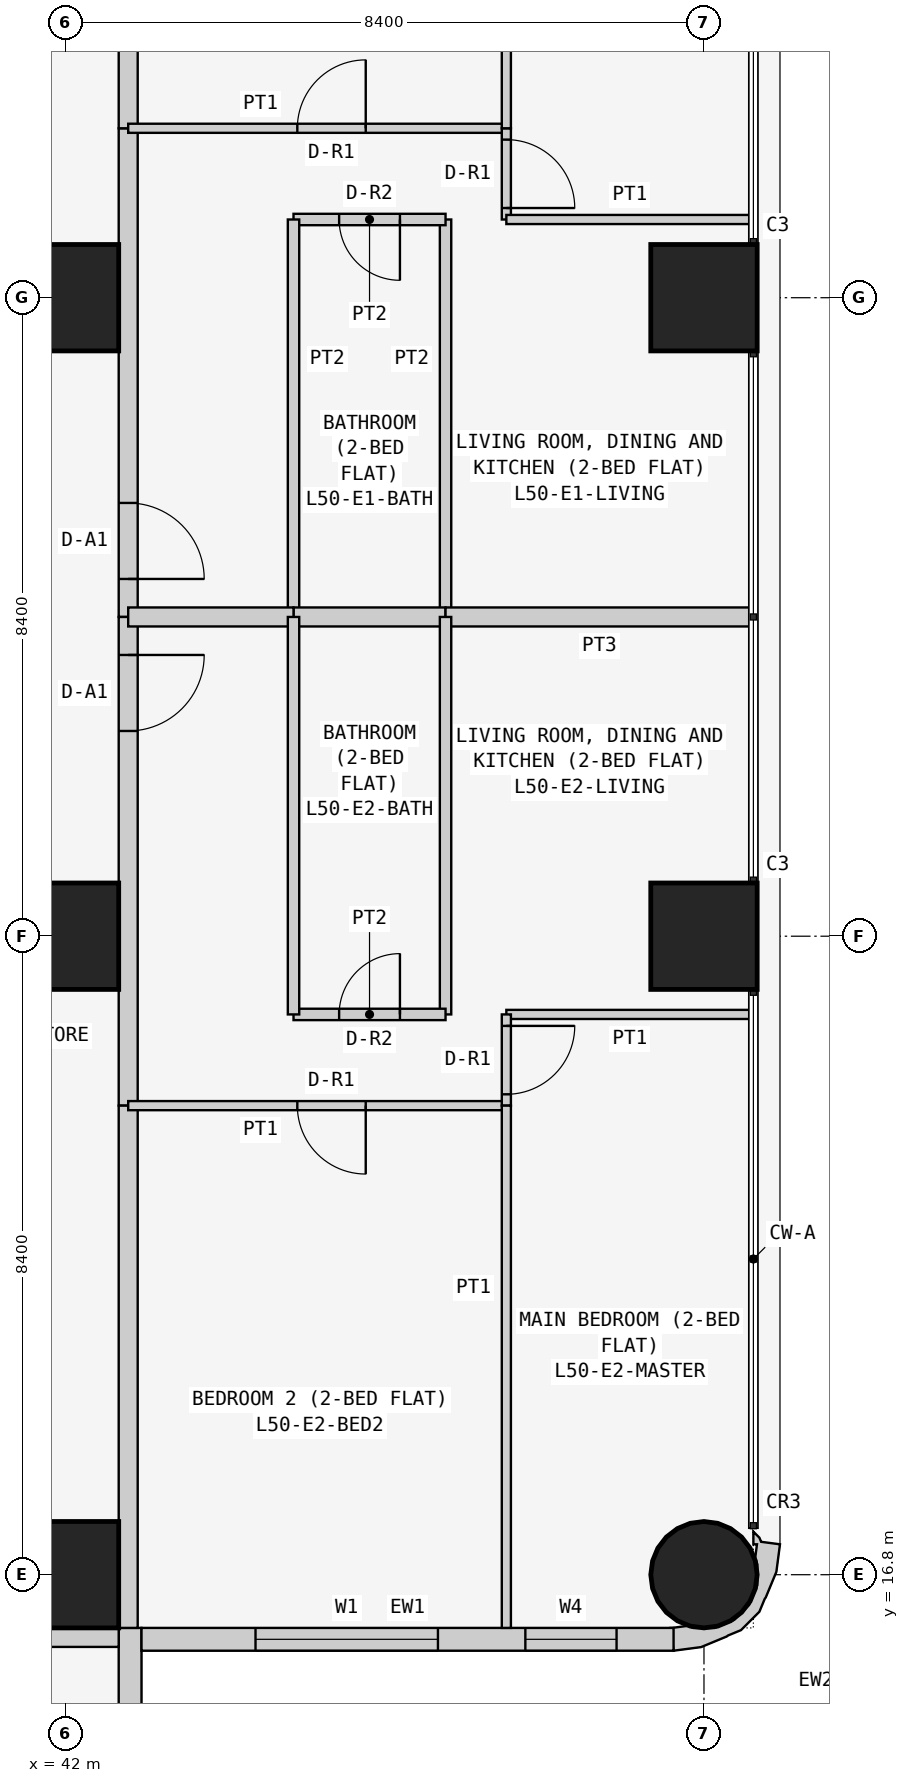
"""IFC4 building model, lengths in metres.
Left out: names, types, materials, properties, quantities, classifications, styles, units other than length and angle.
Written with IfcOpenShell. Run it as: python <this file> out.ifc"""

import sys

from ifc_helpers import new_model, si_unit, direction, frame, frame_2d, origin, origin_2d, place, context, subcontext, project, spatial, polyline, rectangle, circle, outline, extrude, element, fill, save


model = new_model("IFC4")
c1 = context("Model", 3, precision=1e-05, world=origin(), true_north=direction((0.0, 1.0)))
c2 = subcontext(c1, "Body", "Model", "MODEL_VIEW")
j1 = project(units=[si_unit("LENGTHUNIT", "METRE"), si_unit("PLANEANGLEUNIT", "RADIAN")], contexts=[c1])
p1 = place(None, origin())
s1 = spatial("IfcSite", under=j1, at=p1, CompositionType="ELEMENT")
p2 = place(p1, origin())
s2 = spatial("IfcBuilding", under=s1, at=p2, CompositionType="ELEMENT")
p3 = place(p2, frame((0.0, 0.0, 194.1)))
s3 = spatial("IfcBuildingStorey", under=s2, at=p3, CompositionType="ELEMENT", Elevation=194.1)
for number, where, z_axis, x_axis in (
    (1, (42.0, 16.8, 0.0), (0.0, 0.0, 1.0), (1.0, 0.0, 0.0)),
    (2, (42.0, 25.2, 0.0), (0.0, 0.0, 1.0), (1.0, 0.0, 0.0)),
    (3, (42.0, 33.6, 0.0), (0.0, 0.0, 1.0), (1.0, 0.0, 0.0)),
):
    element("IfcColumn", number, at=place(p3, frame(where, z_axis=z_axis, x_axis=x_axis)), inside=s3, PredefinedType="COLUMN", context=c2, shape_type="SweptSolid", body=[
        extrude(rectangle(XDim=1.4, YDim=1.4, at=origin_2d()), origin(), (0.0, 0.0, 1.0), 3.6),
    ])
p4 = place(p3, frame((50.4, 16.8, 0.0), z_axis=(0.0, 0.0, 1.0), x_axis=(1.0, 0.0, 0.0)))
e4 = element("IfcColumn", 4, at=p4, inside=s3, PredefinedType="COLUMN", context=c2, shape_type="SweptSolid", body=[
    extrude(circle(Radius=0.7, at=origin_2d()), origin(), (0.0, 0.0, 1.0), 3.6),
])
for number, where, z_axis, x_axis in (
    (5, (50.4, 25.2, 0.0), (0.0, 0.0, 1.0), (1.0, 0.0, 0.0)),
    (6, (50.4, 33.6, 0.0), (0.0, 0.0, 1.0), (1.0, 0.0, 0.0)),
):
    element("IfcColumn", number, at=place(p3, frame(where, z_axis=z_axis, x_axis=x_axis)), inside=s3, PredefinedType="COLUMN", context=c2, shape_type="SweptSolid", body=[
        extrude(rectangle(XDim=1.4, YDim=1.4, at=origin_2d()), origin(), (0.0, 0.0, 1.0), 3.6),
    ])
p5 = place(p3, frame((42.85, 8.8, 0.0), z_axis=(0.0, 0.0, 1.0), x_axis=(0.0, 1.0, 0.0)))
e7 = element("IfcWall", 7, at=p5, inside=s3, PredefinedType="SOLIDWALL", context=c2, shape_type="SweptSolid", body=[
    extrude(rectangle(XDim=7.3, YDim=0.3, at=frame_2d((3.65, 0.0))), origin(), (0.0, 0.0, 1.0), 3.45),
])
p6 = place(p5, frame((3.1, 0.0, 0.9)))
e8 = element("IfcOpeningElement", 8, at=p6, cuts=e7, PredefinedType="OPENING", context=c2, shape_type="SweptSolid", body=[
    extrude(rectangle(XDim=2.4, YDim=1.5, at=frame_2d((1.2, 0.75))), frame((0.0, 0.16, 0.0), z_axis=(0.0, -1.0, 0.0), x_axis=(1.0, 0.0, 0.0)), (0.0, 0.0, 1.0), 0.32),
])
p7 = place(p5, frame((0.75, 0.0, 0.9)))
e9 = element("IfcOpeningElement", 9, at=p7, cuts=e7, PredefinedType="OPENING", context=c2, shape_type="SweptSolid", body=[
    extrude(rectangle(XDim=1.2, YDim=1.5, at=frame_2d((0.6, 0.75))), frame((0.0, 0.16, 0.0), z_axis=(0.0, -1.0, 0.0), x_axis=(1.0, 0.0, 0.0)), (0.0, 0.0, 1.0), 0.32),
])
p8 = place(p3, frame((43.0, 15.95, 0.0), z_axis=(0.0, 0.0, 1.0), x_axis=(1.0, 0.0, 0.0)))
e10 = element("IfcWall", 10, at=p8, inside=s3, PredefinedType="SOLIDWALL", context=c2, shape_type="SweptSolid", body=[
    extrude(rectangle(XDim=7.0, YDim=0.3, at=frame_2d((3.5, 0.0))), origin(), (0.0, 0.0, 1.0), 3.45),
])
p9 = place(p8, frame((1.5, 0.0, 0.9)))
e11 = element("IfcOpeningElement", 11, at=p9, cuts=e10, PredefinedType="OPENING", context=c2, shape_type="SweptSolid", body=[
    extrude(rectangle(XDim=2.4, YDim=1.5, at=frame_2d((1.2, 0.75))), frame((0.0, 0.16, 0.0), z_axis=(0.0, -1.0, 0.0), x_axis=(1.0, 0.0, 0.0)), (0.0, 0.0, 1.0), 0.32),
])
p10 = place(p8, frame((5.05, 0.0, 0.9)))
e12 = element("IfcOpeningElement", 12, at=p10, cuts=e10, PredefinedType="OPENING", context=c2, shape_type="SweptSolid", body=[
    extrude(rectangle(XDim=1.2, YDim=1.5, at=frame_2d((0.6, 0.75))), frame((0.0, 0.16, 0.0), z_axis=(0.0, -1.0, 0.0), x_axis=(1.0, 0.0, 0.0)), (0.0, 0.0, 1.0), 0.32),
])
p11 = place(p3, frame((50.11, 16.076, 0.0), z_axis=(0.0, 0.0, 1.0), x_axis=(0.898030234854, -0.439933741929, 0.0)))
e13 = element("IfcWall", 13, at=p11, inside=s3, PredefinedType="SOLIDWALL", context=c2, shape_type="SweptSolid", body=[
    extrude(outline(polyline([(0.664, 1.577), (0.426, 1.497), (0.382, 1.536), (0.276, 1.572), (0.349, 1.423), (0.392, 1.444), (0.453, 1.261), (0.51, 1.211), (0.632, 0.961), (0.65, 0.683), (0.56, 0.419), (0.375, 0.21), (0.125, 0.087), (0.05, 0.082), (-0.128, -0.035), (-0.145, -0.044), (0.022, -0.296), (0.327, -0.094), (0.568, 0.18), (0.577, 0.199), (0.7, 0.337), (0.811, 0.661), (0.799, 0.846), (0.803, 0.866), (0.78, 1.231), (0.664, 1.577)])), origin(), (0.0, 0.0, 1.0), 3.45),
])
p12 = place(p3, frame((42.825, 35.829, 0.0), z_axis=(0.0, 0.0, 1.0), x_axis=(0.0, -1.0, 0.0)))
e14 = element("IfcWall", 14, at=p12, inside=s3, PredefinedType="PARTITIONING", context=c2, shape_type="SweptSolid", body=[
    extrude(rectangle(XDim=6.429, YDim=0.25, at=frame_2d((3.215, 0.0))), origin(), (0.0, 0.0, 1.0), 3.45),
])
p13 = place(p12, frame((4.929, 0.0, 0.0)))
e15 = element("IfcOpeningElement", 15, at=p13, cuts=e14, PredefinedType="OPENING", context=c2, shape_type="SweptSolid", body=[
    extrude(rectangle(XDim=1.0, YDim=2.1, at=frame_2d((0.5, 1.05))), frame((0.0, 0.135, 0.0), z_axis=(0.0, -1.0, 0.0), x_axis=(1.0, 0.0, 0.0)), (0.0, 0.0, 1.0), 0.27),
])
p14 = place(p3, frame((42.825, 42.7, 0.0), z_axis=(0.0, 0.0, 1.0), x_axis=(0.0, -1.0, 0.0)))
e16 = element("IfcWall", 16, at=p14, inside=s3, PredefinedType="PARTITIONING", context=c2, shape_type="SweptSolid", body=[
    extrude(rectangle(XDim=6.871, YDim=0.25, at=frame_2d((3.436, 0.0))), origin(), (0.0, 0.0, 1.0), 3.45),
])
p15 = place(p3, frame((42.825, 29.4, 0.0), z_axis=(0.0, 0.0, 1.0), x_axis=(0.0, -1.0, 0.0)))
e17 = element("IfcWall", 17, at=p15, inside=s3, PredefinedType="PARTITIONING", context=c2, shape_type="SweptSolid", body=[
    extrude(rectangle(XDim=6.429, YDim=0.25, at=frame_2d((3.214, 0.0))), origin(), (0.0, 0.0, 1.0), 3.45),
])
p16 = place(p15, frame((0.5, 0.0, 0.0)))
e18 = element("IfcOpeningElement", 18, at=p16, cuts=e17, PredefinedType="OPENING", context=c2, shape_type="SweptSolid", body=[
    extrude(rectangle(XDim=1.0, YDim=2.1, at=frame_2d((0.5, 1.05))), frame((0.0, 0.135, 0.0), z_axis=(0.0, -1.0, 0.0), x_axis=(1.0, 0.0, 0.0)), (0.0, 0.0, 1.0), 0.27),
])
for number, where, z_axis, x_axis in (
    (19, (42.825, 22.971, 0.0), (0.0, 0.0, 1.0), (0.0, -1.0, 0.0)),
    (20, (42.7, 15.975, 0.0), (0.0, 0.0, 1.0), (-1.0, 0.0, 0.0)),
):
    element("IfcWall", number, at=place(p3, frame(where, z_axis=z_axis, x_axis=x_axis)), inside=s3, PredefinedType="PARTITIONING", context=c2, shape_type="SweptSolid", body=[
        extrude(rectangle(XDim=6.871, YDim=0.25, at=frame_2d((3.436, 0.0))), origin(), (0.0, 0.0, 1.0), 3.45),
    ])
p17 = place(p3, frame((47.0, 29.4, 0.0), z_axis=(0.0, 0.0, 1.0), x_axis=(0.0, 1.0, 0.0)))
e21 = element("IfcWall", 21, at=p17, inside=s3, PredefinedType="PARTITIONING", context=c2, shape_type="SweptSolid", body=[
    extrude(rectangle(XDim=5.229, YDim=0.15, at=frame_2d((2.615, 0.0))), origin(), (0.0, 0.0, 1.0), 3.45),
])
p18 = place(p3, frame((47.0, 34.629, 0.0), z_axis=(0.0, 0.0, 1.0), x_axis=(-1.0, 0.0, 0.0)))
e22 = element("IfcWall", 22, at=p18, inside=s3, PredefinedType="PARTITIONING", context=c2, shape_type="SweptSolid", body=[
    extrude(rectangle(XDim=2.0, YDim=0.15, at=frame_2d((1.0, 0.0))), origin(), (0.0, 0.0, 1.0), 3.45),
])
p19 = place(p18, frame((0.6, 0.0, 0.0)))
e23 = element("IfcOpeningElement", 23, at=p19, cuts=e22, PredefinedType="OPENING", context=c2, shape_type="SweptSolid", body=[
    extrude(rectangle(XDim=0.8, YDim=2.1, at=frame_2d((0.4, 1.05))), frame((0.0, 0.085, 0.0), z_axis=(0.0, -1.0, 0.0), x_axis=(1.0, 0.0, 0.0)), (0.0, 0.0, 1.0), 0.17),
])
p20 = place(p3, frame((45.0, 34.629, 0.0), z_axis=(0.0, 0.0, 1.0), x_axis=(0.0, -1.0, 0.0)))
e24 = element("IfcWall", 24, at=p20, inside=s3, PredefinedType="PARTITIONING", context=c2, shape_type="SweptSolid", body=[
    extrude(rectangle(XDim=5.229, YDim=0.15, at=frame_2d((2.615, 0.0))), origin(), (0.0, 0.0, 1.0), 3.45),
])
p21 = place(p3, frame((45.0, 29.4, 0.0), z_axis=(0.0, 0.0, 1.0), x_axis=(1.0, 0.0, 0.0)))
e25 = element("IfcWall", 25, at=p21, inside=s3, PredefinedType="PARTITIONING", context=c2, shape_type="SweptSolid", body=[
    extrude(rectangle(XDim=2.0, YDim=0.25, at=frame_2d((1.0, 0.0))), origin(), (0.0, 0.0, 1.0), 3.45),
])
p22 = place(p3, frame((42.825, 35.829, 0.0), z_axis=(0.0, 0.0, 1.0), x_axis=(1.0, 0.0, 0.0)))
e26 = element("IfcWall", 26, at=p22, inside=s3, PredefinedType="PARTITIONING", context=c2, shape_type="SweptSolid", body=[
    extrude(rectangle(XDim=4.975, YDim=0.12, at=frame_2d((2.488, 0.0))), origin(), (0.0, 0.0, 1.0), 3.45),
])
p23 = place(p22, frame((2.225, 0.0, 0.0)))
e27 = element("IfcOpeningElement", 27, at=p23, cuts=e26, PredefinedType="OPENING", context=c2, shape_type="SweptSolid", body=[
    extrude(rectangle(XDim=0.9, YDim=2.1, at=frame_2d((0.45, 1.05))), frame((0.0, 0.07, 0.0), z_axis=(0.0, -1.0, 0.0), x_axis=(1.0, 0.0, 0.0)), (0.0, 0.0, 1.0), 0.14),
])
p24 = place(p3, frame((47.8, 35.829, 0.0), z_axis=(0.0, 0.0, 1.0), x_axis=(0.0, -1.0, 0.0)))
e28 = element("IfcWall", 28, at=p24, inside=s3, PredefinedType="PARTITIONING", context=c2, shape_type="SweptSolid", body=[
    extrude(rectangle(XDim=1.2, YDim=0.12, at=frame_2d((0.6, 0.0))), origin(), (0.0, 0.0, 1.0), 3.45),
])
p25 = place(p24, frame((0.149, 0.0, 0.0)))
e29 = element("IfcOpeningElement", 29, at=p25, cuts=e28, PredefinedType="OPENING", context=c2, shape_type="SweptSolid", body=[
    extrude(rectangle(XDim=0.9, YDim=2.1, at=frame_2d((0.45, 1.05))), frame((0.0, 0.07, 0.0), z_axis=(0.0, -1.0, 0.0), x_axis=(1.0, 0.0, 0.0)), (0.0, 0.0, 1.0), 0.14),
])
p26 = place(p3, frame((47.8, 34.629, 0.0), z_axis=(0.0, 0.0, 1.0), x_axis=(1.0, 0.0, 0.0)))
e30 = element("IfcWall", 30, at=p26, inside=s3, PredefinedType="PARTITIONING", context=c2, shape_type="SweptSolid", body=[
    extrude(rectangle(XDim=3.25, YDim=0.12, at=frame_2d((1.625, 0.0))), origin(), (0.0, 0.0, 1.0), 3.45),
])
p27 = place(p3, frame((45.0, 29.4, 0.0), z_axis=(0.0, 0.0, 1.0), x_axis=(-1.0, 0.0, 0.0)))
e31 = element("IfcWall", 31, at=p27, inside=s3, PredefinedType="PARTITIONING", context=c2, shape_type="SweptSolid", body=[
    extrude(rectangle(XDim=2.175, YDim=0.25, at=frame_2d((1.087, 0.0))), origin(), (0.0, 0.0, 1.0), 3.45),
])
p28 = place(p3, frame((51.05, 29.4, 0.0), z_axis=(0.0, 0.0, 1.0), x_axis=(-1.0, 0.0, 0.0)))
e32 = element("IfcWall", 32, at=p28, inside=s3, PredefinedType="PARTITIONING", context=c2, shape_type="SweptSolid", body=[
    extrude(rectangle(XDim=4.05, YDim=0.25, at=frame_2d((2.025, 0.0))), origin(), (0.0, 0.0, 1.0), 3.45),
])
p29 = place(p3, frame((47.8, 35.829, 0.0), z_axis=(0.0, 0.0, 1.0), x_axis=(0.0, 1.0, 0.0)))
e33 = element("IfcWall", 33, at=p29, inside=s3, PredefinedType="PARTITIONING", context=c2, shape_type="SweptSolid", body=[
    extrude(rectangle(XDim=6.871, YDim=0.12, at=frame_2d((3.436, 0.0))), origin(), (0.0, 0.0, 1.0), 3.45),
])
p30 = place(p3, frame((47.0, 29.4, 0.0), z_axis=(0.0, 0.0, 1.0), x_axis=(0.0, -1.0, 0.0)))
e34 = element("IfcWall", 34, at=p30, inside=s3, PredefinedType="PARTITIONING", context=c2, shape_type="SweptSolid", body=[
    extrude(rectangle(XDim=5.229, YDim=0.15, at=frame_2d((2.615, 0.0))), origin(), (0.0, 0.0, 1.0), 3.45),
])
p31 = place(p3, frame((47.0, 24.171, 0.0), z_axis=(0.0, 0.0, 1.0), x_axis=(-1.0, 0.0, 0.0)))
e35 = element("IfcWall", 35, at=p31, inside=s3, PredefinedType="PARTITIONING", context=c2, shape_type="SweptSolid", body=[
    extrude(rectangle(XDim=2.0, YDim=0.15, at=frame_2d((1.0, 0.0))), origin(), (0.0, 0.0, 1.0), 3.45),
])
p32 = place(p31, frame((0.6, 0.0, 0.0)))
e36 = element("IfcOpeningElement", 36, at=p32, cuts=e35, PredefinedType="OPENING", context=c2, shape_type="SweptSolid", body=[
    extrude(rectangle(XDim=0.8, YDim=2.1, at=frame_2d((0.4, 1.05))), frame((0.0, 0.085, 0.0), z_axis=(0.0, -1.0, 0.0), x_axis=(1.0, 0.0, 0.0)), (0.0, 0.0, 1.0), 0.17),
])
p33 = place(p3, frame((45.0, 24.171, 0.0), z_axis=(0.0, 0.0, 1.0), x_axis=(0.0, 1.0, 0.0)))
e37 = element("IfcWall", 37, at=p33, inside=s3, PredefinedType="PARTITIONING", context=c2, shape_type="SweptSolid", body=[
    extrude(rectangle(XDim=5.229, YDim=0.15, at=frame_2d((2.615, 0.0))), origin(), (0.0, 0.0, 1.0), 3.45),
])
p34 = place(p3, frame((47.8, 22.971, 0.0), z_axis=(0.0, 0.0, 1.0), x_axis=(-1.0, 0.0, 0.0)))
e38 = element("IfcWall", 38, at=p34, inside=s3, PredefinedType="PARTITIONING", context=c2, shape_type="SweptSolid", body=[
    extrude(rectangle(XDim=4.975, YDim=0.12, at=frame_2d((2.488, 0.0))), origin(), (0.0, 0.0, 1.0), 3.45),
])
p35 = place(p34, frame((1.85, 0.0, 0.0)))
e39 = element("IfcOpeningElement", 39, at=p35, cuts=e38, PredefinedType="OPENING", context=c2, shape_type="SweptSolid", body=[
    extrude(rectangle(XDim=0.9, YDim=2.1, at=frame_2d((0.45, 1.05))), frame((0.0, 0.07, 0.0), z_axis=(0.0, -1.0, 0.0), x_axis=(1.0, 0.0, 0.0)), (0.0, 0.0, 1.0), 0.14),
])
p36 = place(p3, frame((51.05, 24.171, 0.0), z_axis=(0.0, 0.0, 1.0), x_axis=(-1.0, 0.0, 0.0)))
e40 = element("IfcWall", 40, at=p36, inside=s3, PredefinedType="PARTITIONING", context=c2, shape_type="SweptSolid", body=[
    extrude(rectangle(XDim=3.25, YDim=0.12, at=frame_2d((1.625, 0.0))), origin(), (0.0, 0.0, 1.0), 3.45),
])
p37 = place(p3, frame((47.8, 24.171, 0.0), z_axis=(0.0, 0.0, 1.0), x_axis=(0.0, -1.0, 0.0)))
e41 = element("IfcWall", 41, at=p37, inside=s3, PredefinedType="PARTITIONING", context=c2, shape_type="SweptSolid", body=[
    extrude(rectangle(XDim=1.2, YDim=0.12, at=frame_2d((0.6, 0.0))), origin(), (0.0, 0.0, 1.0), 3.45),
])
p38 = place(p37, frame((0.151, 0.0, 0.0)))
e42 = element("IfcOpeningElement", 42, at=p38, cuts=e41, PredefinedType="OPENING", context=c2, shape_type="SweptSolid", body=[
    extrude(rectangle(XDim=0.9, YDim=2.1, at=frame_2d((0.45, 1.05))), frame((0.0, 0.07, 0.0), z_axis=(0.0, -1.0, 0.0), x_axis=(1.0, 0.0, 0.0)), (0.0, 0.0, 1.0), 0.14),
])
p39 = place(p3, frame((47.8, 22.971, 0.0), z_axis=(0.0, 0.0, 1.0), x_axis=(0.0, -1.0, 0.0)))
e43 = element("IfcWall", 43, at=p39, inside=s3, PredefinedType="PARTITIONING", context=c2, shape_type="SweptSolid", body=[
    extrude(rectangle(XDim=6.871, YDim=0.12, at=frame_2d((3.436, 0.0))), origin(), (0.0, 0.0, 1.0), 3.45),
])
p40 = place(p9, origin())
e44 = element("IfcWindow", 44, at=p40, inside=s3, PartitioningType="SINGLE_PANEL", PredefinedType="WINDOW", context=c2, shape_type="SweptSolid", body=[
    extrude(rectangle(XDim=2.4, YDim=1.5, at=frame_2d((1.2, 0.75))), frame((0.0, 0.03, 0.0), z_axis=(0.0, -1.0, 0.0), x_axis=(1.0, 0.0, 0.0)), (0.0, 0.0, 1.0), 0.06),
])
fill(e11, e44)
p41 = place(p10, origin())
e45 = element("IfcWindow", 45, at=p41, inside=s3, PartitioningType="SINGLE_PANEL", PredefinedType="WINDOW", context=c2, shape_type="SweptSolid", body=[
    extrude(rectangle(XDim=1.2, YDim=1.5, at=frame_2d((0.6, 0.75))), frame((0.0, 0.03, 0.0), z_axis=(0.0, -1.0, 0.0), x_axis=(1.0, 0.0, 0.0)), (0.0, 0.0, 1.0), 0.06),
])
fill(e12, e45)
p42 = place(p13, origin())
e46 = element("IfcDoor", 46, at=p42, inside=s3, OperationType="SINGLE_SWING_RIGHT", PredefinedType="DOOR", context=c2, shape_type="SweptSolid", body=[
    extrude(rectangle(XDim=1.0, YDim=2.1, at=frame_2d((0.5, 1.05))), frame((0.0, 0.025, 0.0), z_axis=(0.0, -1.0, 0.0), x_axis=(1.0, 0.0, 0.0)), (0.0, 0.0, 1.0), 0.05),
])
fill(e15, e46)
p43 = place(p19, origin())
e47 = element("IfcDoor", 47, at=p43, inside=s3, OperationType="SINGLE_SWING_LEFT", PredefinedType="DOOR", context=c2, shape_type="SweptSolid", body=[
    extrude(rectangle(XDim=0.8, YDim=2.1, at=frame_2d((0.4, 1.05))), frame((0.0, 0.025, 0.0), z_axis=(0.0, -1.0, 0.0), x_axis=(1.0, 0.0, 0.0)), (0.0, 0.0, 1.0), 0.05),
])
fill(e23, e47)
p44 = place(p23, origin())
e48 = element("IfcDoor", 48, at=p44, inside=s3, OperationType="SINGLE_SWING_RIGHT", PredefinedType="DOOR", context=c2, shape_type="SweptSolid", body=[
    extrude(rectangle(XDim=0.9, YDim=2.1, at=frame_2d((0.45, 1.05))), frame((0.0, 0.025, 0.0), z_axis=(0.0, -1.0, 0.0), x_axis=(1.0, 0.0, 0.0)), (0.0, 0.0, 1.0), 0.05),
])
fill(e27, e48)
p45 = place(p25, origin())
e49 = element("IfcDoor", 49, at=p45, inside=s3, OperationType="SINGLE_SWING_RIGHT", PredefinedType="DOOR", context=c2, shape_type="SweptSolid", body=[
    extrude(rectangle(XDim=0.9, YDim=2.1, at=frame_2d((0.45, 1.05))), frame((0.0, 0.025, 0.0), z_axis=(0.0, -1.0, 0.0), x_axis=(1.0, 0.0, 0.0)), (0.0, 0.0, 1.0), 0.05),
])
fill(e29, e49)
p46 = place(p16, origin())
e50 = element("IfcDoor", 50, at=p46, inside=s3, OperationType="SINGLE_SWING_LEFT", PredefinedType="DOOR", context=c2, shape_type="SweptSolid", body=[
    extrude(rectangle(XDim=1.0, YDim=2.1, at=frame_2d((0.5, 1.05))), frame((0.0, 0.025, 0.0), z_axis=(0.0, -1.0, 0.0), x_axis=(1.0, 0.0, 0.0)), (0.0, 0.0, 1.0), 0.05),
])
fill(e18, e50)
p47 = place(p32, frame((0.8, 0.0, 0.0), z_axis=(0.0, 0.0, 1.0), x_axis=(-1.0, 0.0, 0.0)))
e51 = element("IfcDoor", 51, at=p47, inside=s3, OperationType="SINGLE_SWING_RIGHT", PredefinedType="DOOR", context=c2, shape_type="SweptSolid", body=[
    extrude(rectangle(XDim=0.8, YDim=2.1, at=frame_2d((0.4, 1.05))), frame((0.0, 0.025, 0.0), z_axis=(0.0, -1.0, 0.0), x_axis=(1.0, 0.0, 0.0)), (0.0, 0.0, 1.0), 0.05),
])
fill(e36, e51)
p48 = place(p35, origin())
e52 = element("IfcDoor", 52, at=p48, inside=s3, OperationType="SINGLE_SWING_LEFT", PredefinedType="DOOR", context=c2, shape_type="SweptSolid", body=[
    extrude(rectangle(XDim=0.9, YDim=2.1, at=frame_2d((0.45, 1.05))), frame((0.0, 0.025, 0.0), z_axis=(0.0, -1.0, 0.0), x_axis=(1.0, 0.0, 0.0)), (0.0, 0.0, 1.0), 0.05),
])
fill(e39, e52)
p49 = place(p38, origin())
e53 = element("IfcDoor", 53, at=p49, inside=s3, OperationType="SINGLE_SWING_LEFT", PredefinedType="DOOR", context=c2, shape_type="SweptSolid", body=[
    extrude(rectangle(XDim=0.9, YDim=2.1, at=frame_2d((0.45, 1.05))), frame((0.0, 0.025, 0.0), z_axis=(0.0, -1.0, 0.0), x_axis=(1.0, 0.0, 0.0)), (0.0, 0.0, 1.0), 0.05),
])
fill(e42, e53)
save(model, sys.argv[1])
